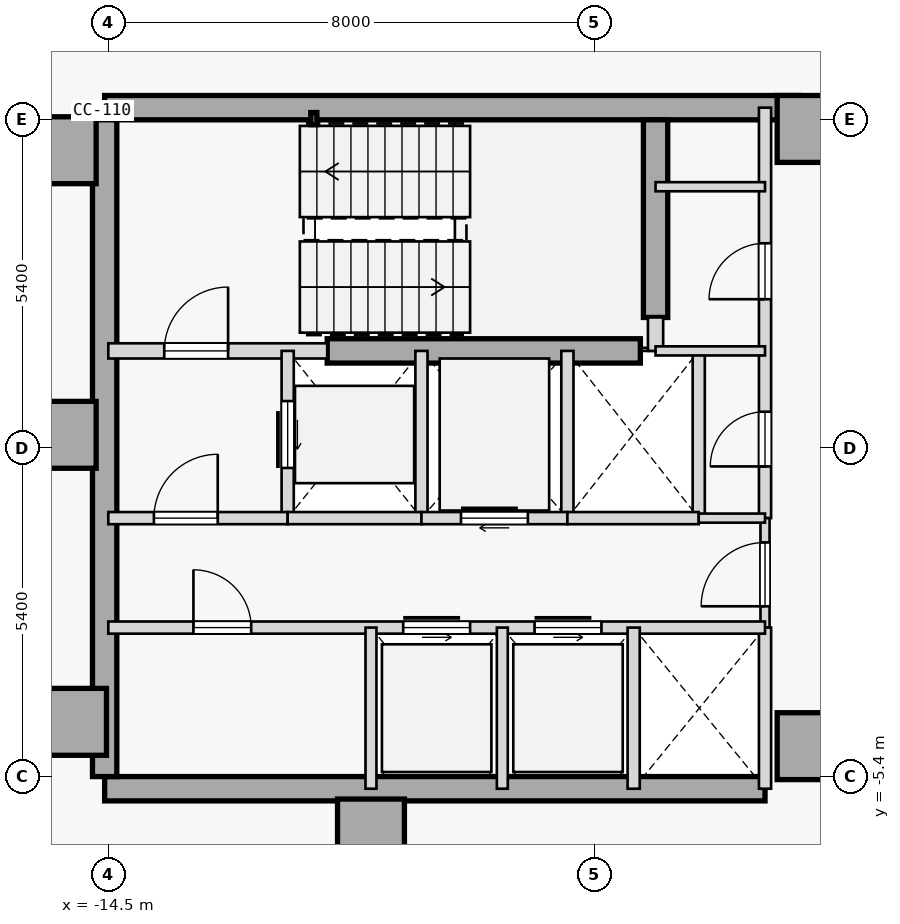
"""IFC4 building model, lengths in metres.
Left out: names, types, materials, properties, quantities, classifications, styles, units other than length and angle.
Written with IfcOpenShell. Run it as: python <this file> out.ifc"""

import sys

from ifc_helpers import new_model, si_unit, direction, frame, frame_2d, origin, origin_2d, place, context, subcontext, project, spatial, rectangle, hollow_rectangle, extrude, element, fill, save


model = new_model("IFC4")
c1 = context("Model", 3, precision=1e-05, world=origin(), true_north=direction((0.0, 1.0)))
c2 = subcontext(c1, "Body", "Model", "MODEL_VIEW")
j1 = project(units=[si_unit("LENGTHUNIT", "METRE"), si_unit("PLANEANGLEUNIT", "RADIAN")], contexts=[c1])
p1 = place(None, origin())
s1 = spatial("IfcSite", under=j1, at=p1, CompositionType="ELEMENT")
p2 = place(p1, origin())
s2 = spatial("IfcBuilding", under=s1, at=p2, CompositionType="ELEMENT")
p3 = place(p2, frame((0.0, 0.0, 109.6)))
s3 = spatial("IfcBuildingStorey", under=s2, at=p3, CompositionType="ELEMENT", Elevation=109.6)
for number, where, z_axis, x_axis in (
    (1, (-15.25, 4.9, 0.0), (0.0, 0.0, 1.0), (1.0, 0.0, 0.0)),
    (2, (-15.25, 0.22, 0.0), (0.0, 0.0, 1.0), (1.0, 0.0, 0.0)),
    (3, (-15.08, -4.5, 0.0), (0.0, 0.0, 1.0), (1.0, 0.0, 0.0)),
    (4, (-10.18, -6.32, 0.0), (0.0, 0.0, 1.0), (1.0, 0.0, 0.0)),
    (5, (-2.95, -4.9, 0.0), (0.0, 0.0, 1.0), (1.0, 0.0, 0.0)),
    (6, (-2.95, 5.25, 0.0), (0.0, 0.0, 1.0), (1.0, 0.0, 0.0)),
):
    element("IfcColumn", number, at=place(p3, frame(where, z_axis=z_axis, x_axis=x_axis)), inside=s3, PredefinedType="COLUMN", context=c2, shape_type="SweptSolid", body=[
        extrude(rectangle(XDim=1.1, YDim=1.1, at=origin_2d()), origin(), (0.0, 0.0, 1.0), 3.7),
    ])
p4 = place(p3, frame((-14.56, 5.6, 0.0), z_axis=(0.0, 0.0, 1.0), x_axis=(1.0, 0.0, 0.0)))
e7 = element("IfcWall", 7, at=p4, inside=s3, PredefinedType="SHEAR", context=c2, shape_type="SweptSolid", body=[
    extrude(rectangle(XDim=11.41, YDim=0.4, at=frame_2d((5.705, 0.0))), origin(), (0.0, 0.0, 1.0), 3.475),
])
p5 = place(p3, frame((-14.56, -5.6, 0.0), z_axis=(0.0, 0.0, 1.0), x_axis=(1.0, 0.0, 0.0)))
e8 = element("IfcWall", 8, at=p5, inside=s3, PredefinedType="SHEAR", context=c2, shape_type="SweptSolid", body=[
    extrude(rectangle(XDim=10.86, YDim=0.4, at=frame_2d((5.43, 0.0))), origin(), (0.0, 0.0, 1.0), 3.475),
])
p6 = place(p3, frame((-14.56, -5.4, 0.0), z_axis=(0.0, 0.0, 1.0), x_axis=(0.0, 1.0, 0.0)))
e9 = element("IfcWall", 9, at=p6, inside=s3, PredefinedType="SHEAR", context=c2, shape_type="SweptSolid", body=[
    extrude(rectangle(XDim=10.8, YDim=0.4, at=frame_2d((5.4, 0.0))), origin(), (0.0, 0.0, 1.0), 3.475),
])
p7 = place(p3, frame((-5.5, 2.15, 0.0), z_axis=(0.0, 0.0, 1.0), x_axis=(0.0, 1.0, 0.0)))
e10 = element("IfcWall", 10, at=p7, inside=s3, PredefinedType="SHEAR", context=c2, shape_type="SweptSolid", body=[
    extrude(rectangle(XDim=3.25, YDim=0.4, at=frame_2d((1.625, 0.0))), origin(), (0.0, 0.0, 1.0), 3.475),
])
p8 = place(p3, frame((-10.9, 1.6, 0.0), z_axis=(0.0, 0.0, 1.0), x_axis=(1.0, 0.0, 0.0)))
e11 = element("IfcWall", 11, at=p8, inside=s3, PredefinedType="SHEAR", context=c2, shape_type="SweptSolid", body=[
    extrude(rectangle(XDim=5.15, YDim=0.4, at=frame_2d((2.575, 0.0))), origin(), (0.0, 0.0, 1.0), 3.475),
])
p9 = place(p3, frame((-11.12, 5.42, 0.0), z_axis=(0.0, 0.0, 1.0), x_axis=(1.0, 0.0, 0.0)))
e12 = element("IfcColumn", 12, at=p9, inside=s3, PredefinedType="COLUMN", context=c2, shape_type="SweptSolid", body=[
    extrude(hollow_rectangle(XDim=0.1, YDim=0.2, WallThickness=0.008, at=origin_2d()), origin(), (0.0, 0.0, 1.0), 3.7),
])
p10 = place(p3, frame((-14.5, 1.6, 0.0), z_axis=(0.0, 0.0, 1.0), x_axis=(1.0, 0.0, 0.0)))
e13 = element("IfcWall", 13, at=p10, inside=s3, PredefinedType="STANDARD", context=c2, shape_type="SweptSolid", body=[
    extrude(rectangle(XDim=3.6, YDim=0.25, at=frame_2d((1.8, 0.0))), origin(), (0.0, 0.0, 1.0), 3.475),
])
p11 = place(p10, frame((0.92, 0.0, 0.0)))
e14 = element("IfcOpeningElement", 14, at=p11, cuts=e13, PredefinedType="OPENING", context=c2, shape_type="SweptSolid", body=[
    extrude(rectangle(XDim=1.05, YDim=2.15, at=frame_2d((0.525, 1.075))), frame((0.0, 0.135, 0.0), z_axis=(0.0, -1.0, 0.0), x_axis=(1.0, 0.0, 0.0)), (0.0, 0.0, 1.0), 0.27),
])
p12 = place(p3, frame((-5.5, 1.6, 0.0), z_axis=(0.0, 0.0, 1.0), x_axis=(0.0, 1.0, 0.0)))
e15 = element("IfcWall", 15, at=p12, inside=s3, PredefinedType="STANDARD", context=c2, shape_type="SweptSolid", body=[
    extrude(rectangle(XDim=0.55, YDim=0.25, at=frame_2d((0.275, 0.0))), origin(), (0.0, 0.0, 1.0), 3.475),
])
p13 = place(p3, frame((-3.7, -1.15, 0.0), z_axis=(0.0, 0.0, 1.0), x_axis=(0.0, 1.0, 0.0)))
e16 = element("IfcWall", 16, at=p13, inside=s3, PredefinedType="STANDARD", context=c2, shape_type="SweptSolid", body=[
    extrude(rectangle(XDim=6.75, YDim=0.2, at=frame_2d((3.375, 0.0))), origin(), (0.0, 0.0, 1.0), 3.475),
])
p14 = place(p13, frame((3.6, 0.0, 0.0)))
e17 = element("IfcOpeningElement", 17, at=p14, cuts=e16, PredefinedType="OPENING", context=c2, shape_type="SweptSolid", body=[
    extrude(rectangle(XDim=0.92, YDim=2.15, at=frame_2d((0.46, 1.075))), frame((0.0, 0.11, 0.0), z_axis=(0.0, -1.0, 0.0), x_axis=(1.0, 0.0, 0.0)), (0.0, 0.0, 1.0), 0.22),
])
p15 = place(p13, frame((0.85, 0.0, 0.0)))
e18 = element("IfcOpeningElement", 18, at=p15, cuts=e16, PredefinedType="OPENING", context=c2, shape_type="SweptSolid", body=[
    extrude(rectangle(XDim=0.9, YDim=2.15, at=frame_2d((0.45, 1.075))), frame((0.0, 0.11, 0.0), z_axis=(0.0, -1.0, 0.0), x_axis=(1.0, 0.0, 0.0)), (0.0, 0.0, 1.0), 0.22),
])
p16 = place(p3, frame((-3.7, -2.95, 0.0), z_axis=(0.0, 0.0, 1.0), x_axis=(0.0, 1.0, 0.0)))
e19 = element("IfcWall", 19, at=p16, inside=s3, PredefinedType="PARTITIONING", context=c2, shape_type="SweptSolid", body=[
    extrude(rectangle(XDim=1.8, YDim=0.15, at=frame_2d((0.9, 0.0))), origin(), (0.0, 0.0, 1.0), 3.475),
])
p17 = place(p16, frame((0.35, 0.0, 0.0)))
e20 = element("IfcOpeningElement", 20, at=p17, cuts=e19, PredefinedType="OPENING", context=c2, shape_type="SweptSolid", body=[
    extrude(rectangle(XDim=1.05, YDim=2.18, at=frame_2d((0.525, 1.09))), frame((0.0, 0.085, 0.0), z_axis=(0.0, -1.0, 0.0), x_axis=(1.0, 0.0, 0.0)), (0.0, 0.0, 1.0), 0.17),
])
p18 = place(p3, frame((-3.7, -5.6, 0.0), z_axis=(0.0, 0.0, 1.0), x_axis=(0.0, 1.0, 0.0)))
e21 = element("IfcWall", 21, at=p18, inside=s3, PredefinedType="STANDARD", context=c2, shape_type="SweptSolid", body=[
    extrude(rectangle(XDim=2.65, YDim=0.2, at=frame_2d((1.325, 0.0))), origin(), (0.0, 0.0, 1.0), 3.475),
])
p19 = place(p3, frame((-11.55, -1.15, 0.0), z_axis=(0.0, 0.0, 1.0), x_axis=(0.0, 1.0, 0.0)))
e22 = element("IfcWall", 22, at=p19, inside=s3, PredefinedType="STANDARD", context=c2, shape_type="SweptSolid", body=[
    extrude(rectangle(XDim=2.75, YDim=0.2, at=frame_2d((1.375, 0.0))), origin(), (0.0, 0.0, 1.0), 3.475),
])
p20 = place(p19, frame((0.825, 0.0, 0.0)))
e23 = element("IfcOpeningElement", 23, at=p20, cuts=e22, PredefinedType="OPENING", context=c2, shape_type="SweptSolid", body=[
    extrude(rectangle(XDim=1.1, YDim=2.15, at=frame_2d((0.55, 1.075))), frame((0.0, 0.11, 0.0), z_axis=(0.0, -1.0, 0.0), x_axis=(1.0, 0.0, 0.0)), (0.0, 0.0, 1.0), 0.22),
])
p21 = place(p3, frame((-9.35, -1.15, 0.0), z_axis=(0.0, 0.0, 1.0), x_axis=(0.0, 1.0, 0.0)))
e24 = element("IfcWall", 24, at=p21, inside=s3, PredefinedType="STANDARD", context=c2, shape_type="SweptSolid", body=[
    extrude(rectangle(XDim=2.75, YDim=0.2, at=frame_2d((1.375, 0.0))), origin(), (0.0, 0.0, 1.0), 3.475),
])
p22 = place(p3, frame((-14.5, -1.15, 0.0), z_axis=(0.0, 0.0, 1.0), x_axis=(1.0, 0.0, 0.0)))
e25 = element("IfcWall", 25, at=p22, inside=s3, PredefinedType="STANDARD", context=c2, shape_type="SweptSolid", body=[
    extrude(rectangle(XDim=2.95, YDim=0.2, at=frame_2d((1.475, 0.0))), origin(), (0.0, 0.0, 1.0), 3.475),
])
p23 = place(p22, frame((0.75, 0.0, 0.0)))
e26 = element("IfcOpeningElement", 26, at=p23, cuts=e25, PredefinedType="OPENING", context=c2, shape_type="SweptSolid", body=[
    extrude(rectangle(XDim=1.05, YDim=2.18, at=frame_2d((0.525, 1.09))), frame((0.0, 0.11, 0.0), z_axis=(0.0, -1.0, 0.0), x_axis=(1.0, 0.0, 0.0)), (0.0, 0.0, 1.0), 0.22),
])
p24 = place(p3, frame((-11.55, -1.15, 0.0), z_axis=(0.0, 0.0, 1.0), x_axis=(1.0, 0.0, 0.0)))
e27 = element("IfcWall", 27, at=p24, inside=s3, PredefinedType="STANDARD", context=c2, shape_type="SweptSolid", body=[
    extrude(rectangle(XDim=2.2, YDim=0.2, at=frame_2d((1.1, 0.0))), origin(), (0.0, 0.0, 1.0), 3.475),
])
p25 = place(p3, frame((-6.95, -1.15, 0.0), z_axis=(0.0, 0.0, 1.0), x_axis=(0.0, 1.0, 0.0)))
e28 = element("IfcWall", 28, at=p25, inside=s3, PredefinedType="STANDARD", context=c2, shape_type="SweptSolid", body=[
    extrude(rectangle(XDim=2.75, YDim=0.2, at=frame_2d((1.375, 0.0))), origin(), (0.0, 0.0, 1.0), 3.475),
])
p26 = place(p3, frame((-9.35, -1.15, 0.0), z_axis=(0.0, 0.0, 1.0), x_axis=(1.0, 0.0, 0.0)))
e29 = element("IfcWall", 29, at=p26, inside=s3, PredefinedType="STANDARD", context=c2, shape_type="SweptSolid", body=[
    extrude(rectangle(XDim=2.4, YDim=0.2, at=frame_2d((1.2, 0.0))), origin(), (0.0, 0.0, 1.0), 3.475),
])
p27 = place(p26, frame((0.65, 0.0, 0.0)))
e30 = element("IfcOpeningElement", 30, at=p27, cuts=e29, PredefinedType="OPENING", context=c2, shape_type="SweptSolid", body=[
    extrude(rectangle(XDim=1.1, YDim=2.15, at=frame_2d((0.55, 1.075))), frame((0.0, 0.11, 0.0), z_axis=(0.0, -1.0, 0.0), x_axis=(1.0, 0.0, 0.0)), (0.0, 0.0, 1.0), 0.22),
])
p28 = place(p3, frame((-4.79, -1.15, 0.0), z_axis=(0.0, 0.0, 1.0), x_axis=(0.0, 1.0, 0.0)))
e31 = element("IfcWall", 31, at=p28, inside=s3, PredefinedType="STANDARD", context=c2, shape_type="SweptSolid", body=[
    extrude(rectangle(XDim=2.75, YDim=0.2, at=frame_2d((1.375, 0.0))), origin(), (0.0, 0.0, 1.0), 3.475),
])
p29 = place(p3, frame((-6.95, -1.15, 0.0), z_axis=(0.0, 0.0, 1.0), x_axis=(1.0, 0.0, 0.0)))
e32 = element("IfcWall", 32, at=p29, inside=s3, PredefinedType="STANDARD", context=c2, shape_type="SweptSolid", body=[
    extrude(rectangle(XDim=2.16, YDim=0.2, at=frame_2d((1.08, 0.0))), origin(), (0.0, 0.0, 1.0), 3.475),
])
p30 = place(p3, frame((-4.79, -1.15, 0.0), z_axis=(0.0, 0.0, 1.0), x_axis=(1.0, 0.0, 0.0)))
e33 = element("IfcWall", 33, at=p30, inside=s3, PredefinedType="PARTITIONING", context=c2, shape_type="SweptSolid", body=[
    extrude(rectangle(XDim=1.09, YDim=0.15, at=frame_2d((0.545, 0.0))), origin(), (0.0, 0.0, 1.0), 3.475),
])
p31 = place(p3, frame((-14.5, -2.95, 0.0), z_axis=(0.0, 0.0, 1.0), x_axis=(1.0, 0.0, 0.0)))
e34 = element("IfcWall", 34, at=p31, inside=s3, PredefinedType="STANDARD", context=c2, shape_type="SweptSolid", body=[
    extrude(rectangle(XDim=10.8, YDim=0.2, at=frame_2d((5.4, 0.0))), origin(), (0.0, 0.0, 1.0), 3.475),
])
p32 = place(p31, frame((4.85, 0.0, 0.0)))
e35 = element("IfcOpeningElement", 35, at=p32, cuts=e34, PredefinedType="OPENING", context=c2, shape_type="SweptSolid", body=[
    extrude(rectangle(XDim=1.1, YDim=2.15, at=frame_2d((0.55, 1.075))), frame((0.0, 0.11, 0.0), z_axis=(0.0, -1.0, 0.0), x_axis=(1.0, 0.0, 0.0)), (0.0, 0.0, 1.0), 0.22),
])
p33 = place(p31, frame((7.01, 0.0, 0.0)))
e36 = element("IfcOpeningElement", 36, at=p33, cuts=e34, PredefinedType="OPENING", context=c2, shape_type="SweptSolid", body=[
    extrude(rectangle(XDim=1.1, YDim=2.15, at=frame_2d((0.55, 1.075))), frame((0.0, 0.11, 0.0), z_axis=(0.0, -1.0, 0.0), x_axis=(1.0, 0.0, 0.0)), (0.0, 0.0, 1.0), 0.22),
])
p34 = place(p31, frame((1.4, 0.0, 0.0)))
e37 = element("IfcOpeningElement", 37, at=p34, cuts=e34, PredefinedType="OPENING", context=c2, shape_type="SweptSolid", body=[
    extrude(rectangle(XDim=0.95, YDim=2.15, at=frame_2d((0.475, 1.075))), frame((0.0, 0.11, 0.0), z_axis=(0.0, -1.0, 0.0), x_axis=(1.0, 0.0, 0.0)), (0.0, 0.0, 1.0), 0.22),
])
p35 = place(p3, frame((-5.86, -5.6, 0.0), z_axis=(0.0, 0.0, 1.0), x_axis=(0.0, 1.0, 0.0)))
e38 = element("IfcWall", 38, at=p35, inside=s3, PredefinedType="STANDARD", context=c2, shape_type="SweptSolid", body=[
    extrude(rectangle(XDim=2.65, YDim=0.2, at=frame_2d((1.325, 0.0))), origin(), (0.0, 0.0, 1.0), 3.475),
])
for number, where, z_axis, x_axis in (
    (39, (-10.18, -5.6, 0.0), (0.0, 0.0, 1.0), (0.0, 1.0, 0.0)),
    (40, (-8.02, -5.6, 0.0), (0.0, 0.0, 1.0), (0.0, 1.0, 0.0)),
):
    element("IfcWall", number, at=place(p3, frame(where, z_axis=z_axis, x_axis=x_axis)), inside=s3, PredefinedType="STANDARD", context=c2, shape_type="SweptSolid", body=[
        extrude(rectangle(XDim=2.65, YDim=0.18, at=frame_2d((1.325, 0.0))), origin(), (0.0, 0.0, 1.0), 3.475),
    ])
for number, where, z_axis, x_axis in (
    (41, (-5.5, 4.3, 0.0), (0.0, 0.0, 1.0), (1.0, 0.0, 0.0)),
    (42, (-5.5, 1.6, 0.0), (0.0, 0.0, 1.0), (1.0, 0.0, 0.0)),
):
    element("IfcWall", number, at=place(p3, frame(where, z_axis=z_axis, x_axis=x_axis)), inside=s3, PredefinedType="PARTITIONING", context=c2, shape_type="SweptSolid", body=[
        extrude(rectangle(XDim=1.8, YDim=0.15, at=frame_2d((0.9, 0.0))), origin(), (0.0, 0.0, 1.0), 3.475),
    ])
p36 = place(p11, origin())
e43 = element("IfcDoor", 43, at=p36, inside=s3, OperationType="SINGLE_SWING_RIGHT", PredefinedType="DOOR", context=c2, shape_type="SweptSolid", body=[
    extrude(rectangle(XDim=1.05, YDim=2.15, at=frame_2d((0.525, 1.075))), frame((0.0, 0.025, 0.0), z_axis=(0.0, -1.0, 0.0), x_axis=(1.0, 0.0, 0.0)), (0.0, 0.0, 1.0), 0.05),
])
fill(e14, e43)
p37 = place(p23, origin())
e44 = element("IfcDoor", 44, at=p37, inside=s3, OperationType="SINGLE_SWING_RIGHT", PredefinedType="DOOR", context=c2, shape_type="SweptSolid", body=[
    extrude(rectangle(XDim=1.05, YDim=2.18, at=frame_2d((0.525, 1.09))), frame((0.0, 0.025, 0.0), z_axis=(0.0, -1.0, 0.0), x_axis=(1.0, 0.0, 0.0)), (0.0, 0.0, 1.0), 0.05),
])
fill(e26, e44)
p38 = place(p17, origin())
e45 = element("IfcDoor", 45, at=p38, inside=s3, OperationType="SINGLE_SWING_LEFT", PredefinedType="DOOR", context=c2, shape_type="SweptSolid", body=[
    extrude(rectangle(XDim=1.05, YDim=2.18, at=frame_2d((0.525, 1.09))), frame((0.0, 0.025, 0.0), z_axis=(0.0, -1.0, 0.0), x_axis=(1.0, 0.0, 0.0)), (0.0, 0.0, 1.0), 0.05),
])
fill(e20, e45)
p39 = place(p20, origin())
e46 = element("IfcDoor", 46, at=p39, inside=s3, OperationType="SLIDING_TO_RIGHT", PredefinedType="DOOR", context=c2, shape_type="SweptSolid", body=[
    extrude(rectangle(XDim=1.1, YDim=2.15, at=frame_2d((0.55, 1.075))), frame((0.0, 0.025, 0.0), z_axis=(0.0, -1.0, 0.0), x_axis=(1.0, 0.0, 0.0)), (0.0, 0.0, 1.0), 0.05),
])
fill(e23, e46)
p40 = place(p27, origin())
e47 = element("IfcDoor", 47, at=p40, inside=s3, OperationType="SLIDING_TO_RIGHT", PredefinedType="DOOR", context=c2, shape_type="SweptSolid", body=[
    extrude(rectangle(XDim=1.1, YDim=2.15, at=frame_2d((0.55, 1.075))), frame((0.0, 0.025, 0.0), z_axis=(0.0, -1.0, 0.0), x_axis=(1.0, 0.0, 0.0)), (0.0, 0.0, 1.0), 0.05),
])
fill(e30, e47)
p41 = place(p32, origin())
e48 = element("IfcDoor", 48, at=p41, inside=s3, OperationType="SLIDING_TO_LEFT", PredefinedType="DOOR", context=c2, shape_type="SweptSolid", body=[
    extrude(rectangle(XDim=1.1, YDim=2.15, at=frame_2d((0.55, 1.075))), frame((0.0, 0.025, 0.0), z_axis=(0.0, -1.0, 0.0), x_axis=(1.0, 0.0, 0.0)), (0.0, 0.0, 1.0), 0.05),
])
fill(e35, e48)
p42 = place(p33, origin())
e49 = element("IfcDoor", 49, at=p42, inside=s3, OperationType="SLIDING_TO_LEFT", PredefinedType="DOOR", context=c2, shape_type="SweptSolid", body=[
    extrude(rectangle(XDim=1.1, YDim=2.15, at=frame_2d((0.55, 1.075))), frame((0.0, 0.025, 0.0), z_axis=(0.0, -1.0, 0.0), x_axis=(1.0, 0.0, 0.0)), (0.0, 0.0, 1.0), 0.05),
])
fill(e36, e49)
p43 = place(p34, origin())
e50 = element("IfcDoor", 50, at=p43, inside=s3, OperationType="SINGLE_SWING_LEFT", PredefinedType="DOOR", context=c2, shape_type="SweptSolid", body=[
    extrude(rectangle(XDim=0.95, YDim=2.15, at=frame_2d((0.475, 1.075))), frame((0.0, 0.025, 0.0), z_axis=(0.0, -1.0, 0.0), x_axis=(1.0, 0.0, 0.0)), (0.0, 0.0, 1.0), 0.05),
])
fill(e37, e50)
p44 = place(p14, origin())
e51 = element("IfcDoor", 51, at=p44, inside=s3, OperationType="SINGLE_SWING_LEFT", PredefinedType="DOOR", context=c2, shape_type="SweptSolid", body=[
    extrude(rectangle(XDim=0.92, YDim=2.15, at=frame_2d((0.46, 1.075))), frame((0.0, 0.025, 0.0), z_axis=(0.0, -1.0, 0.0), x_axis=(1.0, 0.0, 0.0)), (0.0, 0.0, 1.0), 0.05),
])
fill(e17, e51)
p45 = place(p15, origin())
e52 = element("IfcDoor", 52, at=p45, inside=s3, OperationType="SINGLE_SWING_LEFT", PredefinedType="DOOR", context=c2, shape_type="SweptSolid", body=[
    extrude(rectangle(XDim=0.9, YDim=2.15, at=frame_2d((0.45, 1.075))), frame((0.0, 0.025, 0.0), z_axis=(0.0, -1.0, 0.0), x_axis=(1.0, 0.0, 0.0)), (0.0, 0.0, 1.0), 0.05),
])
fill(e18, e52)
save(model, sys.argv[1])
